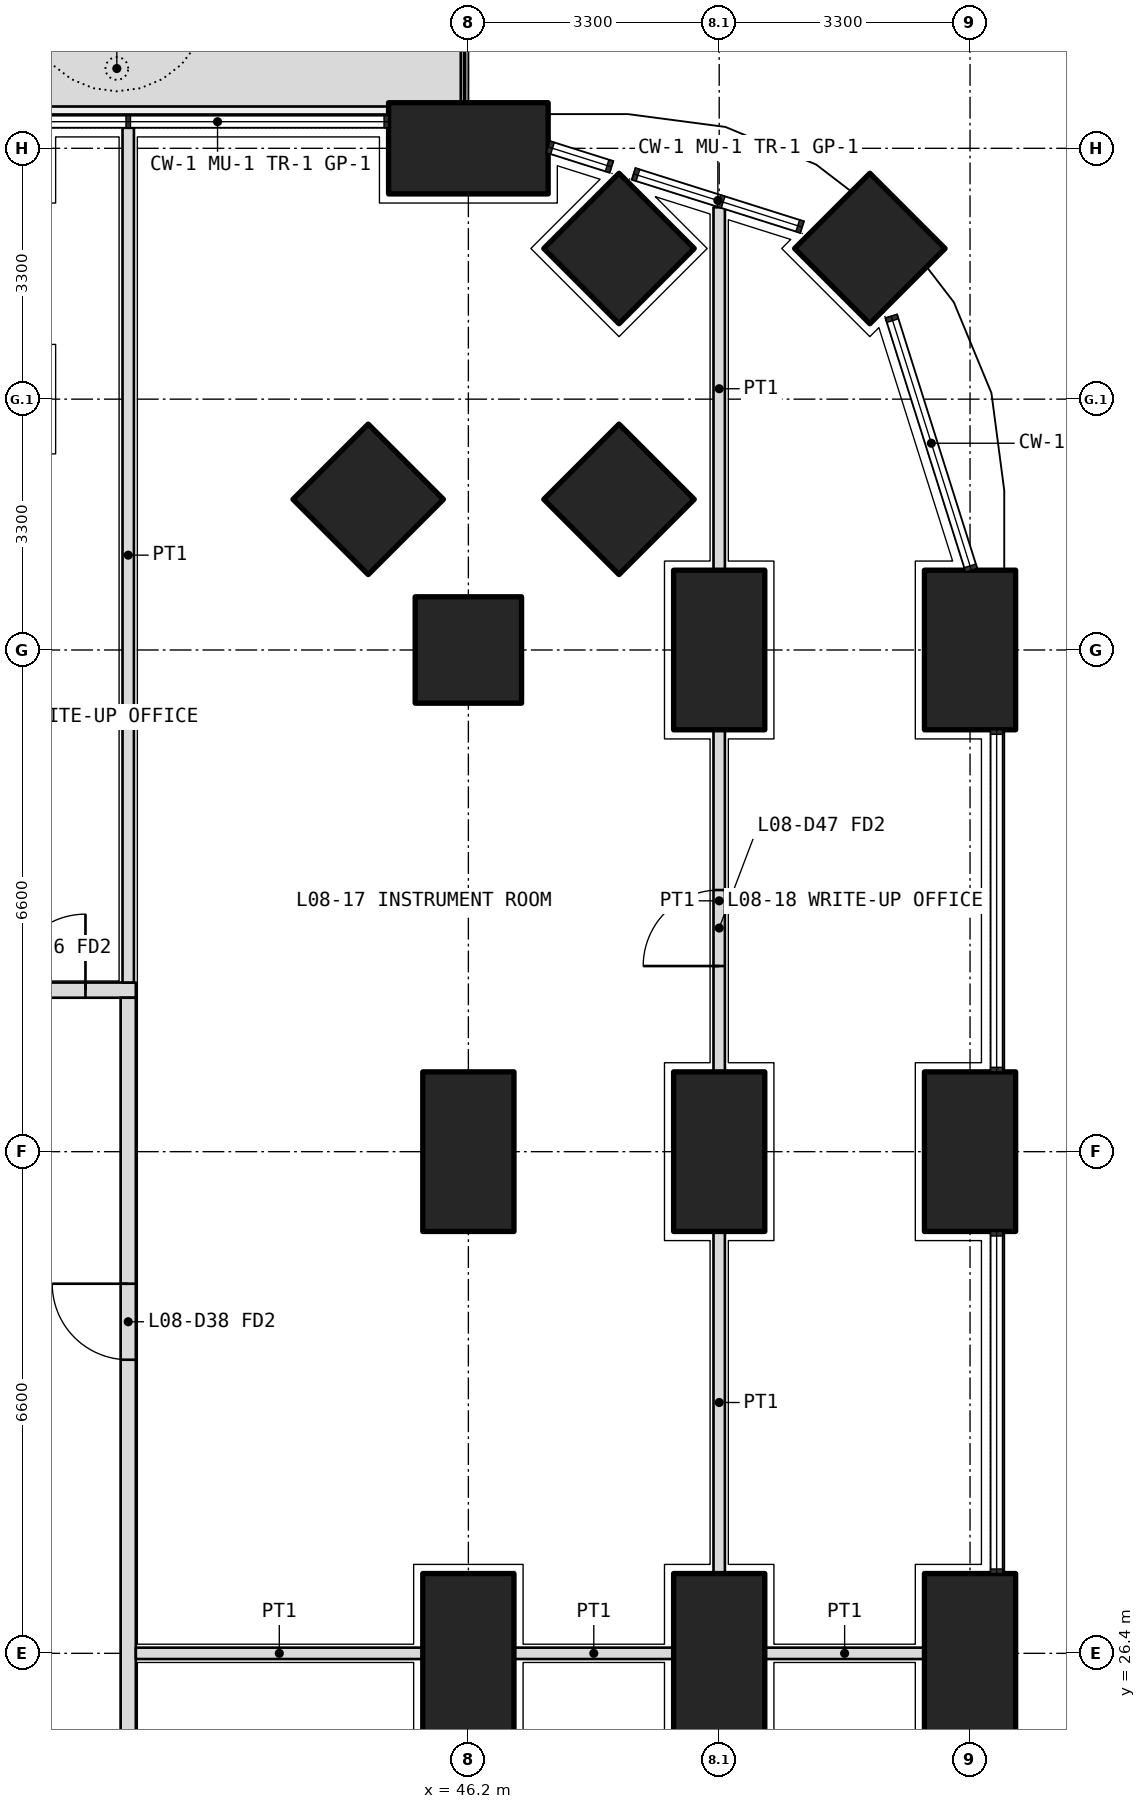
"""IFC4 building model, lengths in metres.
Left out: names, types, materials, properties, quantities, classifications, styles, units other than length and angle.
Written with IfcOpenShell. Run it as: python <this file> out.ifc"""

import sys

from ifc_helpers import new_model, si_unit, direction, frame, frame_2d, origin, origin_2d, place, context, subcontext, project, spatial, polyline, rectangle, outline, extrude, element, fill, save


model = new_model("IFC4")
c1 = context("Model", 3, precision=1e-05, world=origin(), true_north=direction((0.0, 1.0)))
c2 = subcontext(c1, "Body", "Model", "MODEL_VIEW")
j1 = project(units=[si_unit("LENGTHUNIT", "METRE"), si_unit("PLANEANGLEUNIT", "RADIAN")], contexts=[c1])
p1 = place(None, origin())
s1 = spatial("IfcSite", under=j1, at=p1, CompositionType="ELEMENT")
p2 = place(p1, origin())
s2 = spatial("IfcBuilding", under=s1, at=p2, CompositionType="ELEMENT")
p3 = place(p2, frame((0.0, 0.0, 38.1)))
s3 = spatial("IfcBuildingStorey", under=s2, at=p3, CompositionType="ELEMENT", Elevation=38.1)
p4 = place(p3, frame((51.482, 44.882, 0.0), z_axis=(0.0, 0.0, 1.0), x_axis=(0.707106781187, 0.707106781187, 0.0)))
e1 = element("IfcColumn", 1, at=p4, inside=s3, PredefinedType="COLUMN", context=c2, shape_type="SweptSolid", body=[
    extrude(rectangle(XDim=1.4, YDim=1.4, at=origin_2d()), origin(), (0.0, 0.0, 1.0), 4.2),
])
for number, where, z_axis, x_axis in (
    (2, (52.8, 26.4, 0.0), (0.0, 0.0, 1.0), (0.0, 1.0, 0.0)),
    (3, (52.8, 33.0, 0.0), (0.0, 0.0, 1.0), (0.0, 1.0, 0.0)),
    (4, (52.8, 39.6, 0.0), (0.0, 0.0, 1.0), (0.0, 1.0, 0.0)),
    (5, (46.2, 46.2, 0.0), (0.0, 0.0, 1.0), (1.0, 0.0, 0.0)),
):
    element("IfcColumn", number, at=place(p3, frame(where, z_axis=z_axis, x_axis=x_axis)), inside=s3, PredefinedType="COLUMN", context=c2, shape_type="SweptSolid", body=[
        extrude(rectangle(XDim=2.1, YDim=1.2, at=origin_2d()), origin(), (0.0, 0.0, 1.0), 4.2),
    ])
for number, where, z_axis, x_axis in (
    (6, (46.2, 39.6, 0.0), (0.0, 0.0, 1.0), (1.0, 0.0, 0.0)),
    (7, (48.182, 44.882, 0.0), (0.0, 0.0, 1.0), (0.707, 0.707, 0.0)),
):
    element("IfcColumn", number, at=place(p3, frame(where, z_axis=z_axis, x_axis=x_axis)), inside=s3, PredefinedType="COLUMN", context=c2, shape_type="SweptSolid", body=[
        extrude(rectangle(XDim=1.4, YDim=1.4, at=origin_2d()), origin(), (0.0, 0.0, 1.0), 4.2),
    ])
for number, where, z_axis, x_axis in (
    (8, (49.5, 26.4, 0.0), (0.0, 0.0, 1.0), (0.0, 1.0, 0.0)),
    (9, (49.5, 33.0, 0.0), (0.0, 0.0, 1.0), (0.0, 1.0, 0.0)),
    (10, (49.5, 39.6, 0.0), (0.0, 0.0, 1.0), (0.0, 1.0, 0.0)),
):
    element("IfcColumn", number, at=place(p3, frame(where, z_axis=z_axis, x_axis=x_axis)), inside=s3, PredefinedType="COLUMN", context=c2, shape_type="SweptSolid", body=[
        extrude(rectangle(XDim=2.1, YDim=1.2, at=origin_2d()), origin(), (0.0, 0.0, 1.0), 4.2),
    ])
for number, where, z_axis, x_axis in (
    (11, (48.182, 41.582, 0.0), (0.0, 0.0, 1.0), (0.707, 0.707, 0.0)),
    (12, (44.882, 41.582, 0.0), (0.0, 0.0, 1.0), (0.707, 0.707, 0.0)),
):
    element("IfcColumn", number, at=place(p3, frame(where, z_axis=z_axis, x_axis=x_axis)), inside=s3, PredefinedType="COLUMN", context=c2, shape_type="SweptSolid", body=[
        extrude(rectangle(XDim=1.4, YDim=1.4, at=origin_2d()), origin(), (0.0, 0.0, 1.0), 4.2),
    ])
for number, where, z_axis, x_axis in (
    (13, (46.2, 26.4, 0.0), (0.0, 0.0, 1.0), (0.0, 1.0, 0.0)),
    (14, (46.2, 33.0, 0.0), (0.0, 0.0, 1.0), (0.0, 1.0, 0.0)),
):
    element("IfcColumn", number, at=place(p3, frame(where, z_axis=z_axis, x_axis=x_axis)), inside=s3, PredefinedType="COLUMN", context=c2, shape_type="SweptSolid", body=[
        extrude(rectangle(XDim=2.1, YDim=1.2, at=origin_2d()), origin(), (0.0, 0.0, 1.0), 4.2),
    ])
p5 = place(p3, origin())
e15 = element("IfcWall", 15, at=p5, inside=s3, PredefinedType="USERDEFINED", context=c2, shape_type="SweptSolid", body=[
    extrude(outline(polyline([(37.05, 46.75), (46.1, 46.75), (46.1, 47.75), (37.05, 47.75), (37.05, 46.75)]), holes=[polyline([(37.2, 46.9), (45.95, 46.9), (45.95, 47.6), (37.2, 47.6), (37.2, 46.9)])]), origin(), (0.0, 0.0, 1.0), 1.05),
])
p6 = place(p3, frame((33.0, 35.125, 0.0), z_axis=(0.0, 0.0, 1.0), x_axis=(1.0, 0.0, 0.0)))
e16 = element("IfcWall", 16, at=p6, inside=s3, PredefinedType="PARTITIONING", context=c2, shape_type="SweptSolid", body=[
    extrude(rectangle(XDim=8.825, YDim=0.2, at=frame_2d((4.413, 0.0))), origin(), (0.0, 0.0, 1.0), 2.85),
])
p7 = place(p6, frame((1.2, 0.0, 0.0)))
e17 = element("IfcOpeningElement", 17, at=p7, cuts=e16, PredefinedType="OPENING", context=c2, shape_type="SweptSolid", body=[
    extrude(rectangle(XDim=1.0, YDim=2.1, at=frame_2d((0.5, 1.05))), frame((0.0, 0.11, 0.0), z_axis=(0.0, -1.0, 0.0), x_axis=(1.0, 0.0, 0.0)), (0.0, 0.0, 1.0), 0.22),
])
p8 = place(p6, frame((4.5, 0.0, 0.0)))
e18 = element("IfcOpeningElement", 18, at=p8, cuts=e16, PredefinedType="OPENING", context=c2, shape_type="SweptSolid", body=[
    extrude(rectangle(XDim=1.0, YDim=2.1, at=frame_2d((0.5, 1.05))), frame((0.0, 0.11, 0.0), z_axis=(0.0, -1.0, 0.0), x_axis=(1.0, 0.0, 0.0)), (0.0, 0.0, 1.0), 0.22),
])
p9 = place(p6, frame((7.163, 0.0, 0.0)))
e19 = element("IfcOpeningElement", 19, at=p9, cuts=e16, PredefinedType="OPENING", context=c2, shape_type="SweptSolid", body=[
    extrude(rectangle(XDim=1.0, YDim=2.1, at=frame_2d((0.5, 1.05))), frame((0.0, 0.11, 0.0), z_axis=(0.0, -1.0, 0.0), x_axis=(1.0, 0.0, 0.0)), (0.0, 0.0, 1.0), 0.22),
])
p10 = place(p3, frame((41.725, 11.175, 0.0), z_axis=(0.0, 0.0, 1.0), x_axis=(0.0, 1.0, 0.0)))
e20 = element("IfcWall", 20, at=p10, inside=s3, PredefinedType="PARTITIONING", context=c2, shape_type="SweptSolid", body=[
    extrude(rectangle(XDim=23.85, YDim=0.2, at=frame_2d((11.925, 0.0))), origin(), (0.0, 0.0, 1.0), 2.85),
])
p11 = place(p10, frame((2.113, 0.0, 0.0)))
e21 = element("IfcOpeningElement", 21, at=p11, cuts=e20, PredefinedType="OPENING", context=c2, shape_type="SweptSolid", body=[
    extrude(rectangle(XDim=1.0, YDim=2.1, at=frame_2d((0.5, 1.05))), frame((0.0, 0.11, 0.0), z_axis=(0.0, -1.0, 0.0), x_axis=(1.0, 0.0, 0.0)), (0.0, 0.0, 1.0), 0.22),
])
p12 = place(p10, frame((6.475, 0.0, 0.0)))
e22 = element("IfcOpeningElement", 22, at=p12, cuts=e20, PredefinedType="OPENING", context=c2, shape_type="SweptSolid", body=[
    extrude(rectangle(XDim=1.0, YDim=2.1, at=frame_2d((0.5, 1.05))), frame((0.0, 0.11, 0.0), z_axis=(0.0, -1.0, 0.0), x_axis=(1.0, 0.0, 0.0)), (0.0, 0.0, 1.0), 0.22),
])
p13 = place(p10, frame((9.625, 0.0, 0.0)))
e23 = element("IfcOpeningElement", 23, at=p13, cuts=e20, PredefinedType="OPENING", context=c2, shape_type="SweptSolid", body=[
    extrude(rectangle(XDim=1.0, YDim=2.1, at=frame_2d((0.5, 1.05))), frame((0.0, 0.11, 0.0), z_axis=(0.0, -1.0, 0.0), x_axis=(1.0, 0.0, 0.0)), (0.0, 0.0, 1.0), 0.22),
])
p14 = place(p10, frame((12.975, 0.0, 0.0)))
e24 = element("IfcOpeningElement", 24, at=p14, cuts=e20, PredefinedType="OPENING", context=c2, shape_type="SweptSolid", body=[
    extrude(rectangle(XDim=0.9, YDim=2.1, at=frame_2d((0.45, 1.05))), frame((0.0, 0.11, 0.0), z_axis=(0.0, -1.0, 0.0), x_axis=(1.0, 0.0, 0.0)), (0.0, 0.0, 1.0), 0.22),
])
p15 = place(p10, frame((19.087, 0.0, 0.0)))
e25 = element("IfcOpeningElement", 25, at=p15, cuts=e20, PredefinedType="OPENING", context=c2, shape_type="SweptSolid", body=[
    extrude(rectangle(XDim=1.0, YDim=2.1, at=frame_2d((0.5, 1.05))), frame((0.0, 0.11, 0.0), z_axis=(0.0, -1.0, 0.0), x_axis=(1.0, 0.0, 0.0)), (0.0, 0.0, 1.0), 0.22),
])
p16 = place(p3, frame((41.725, 46.47, 0.0), z_axis=(0.0, 0.0, 1.0), x_axis=(0.0, -1.0, 0.0)))
e26 = element("IfcWall", 26, at=p16, inside=s3, PredefinedType="PARTITIONING", context=c2, shape_type="SweptSolid", body=[
    extrude(rectangle(XDim=11.245, YDim=0.15, at=frame_2d((5.623, 0.0))), origin(), (0.0, 0.0, 1.0), 2.7),
])
p17 = place(p3, frame((49.5, 27.45, 0.0), z_axis=(0.0, 0.0, 1.0), x_axis=(0.0, 1.0, 0.0)))
e27 = element("IfcWall", 27, at=p17, inside=s3, PredefinedType="PARTITIONING", context=c2, shape_type="SweptSolid", body=[
    extrude(rectangle(XDim=4.5, YDim=0.15, at=frame_2d((2.25, 0.0))), origin(), (0.0, 0.0, 1.0), 3.9),
])
p18 = place(p3, frame((49.5, 34.05, 0.0), z_axis=(0.0, 0.0, 1.0), x_axis=(0.0, 1.0, 0.0)))
e28 = element("IfcWall", 28, at=p18, inside=s3, PredefinedType="PARTITIONING", context=c2, shape_type="SweptSolid", body=[
    extrude(rectangle(XDim=4.5, YDim=0.15, at=frame_2d((2.25, 0.0))), origin(), (0.0, 0.0, 1.0), 3.9),
])
p19 = place(p18, frame((1.392, 0.0, 0.0)))
e29 = element("IfcOpeningElement", 29, at=p19, cuts=e28, PredefinedType="OPENING", context=c2, shape_type="SweptSolid", body=[
    extrude(rectangle(XDim=1.0, YDim=2.1, at=frame_2d((0.5, 1.05))), frame((0.0, 0.085, 0.0), z_axis=(0.0, -1.0, 0.0), x_axis=(1.0, 0.0, 0.0)), (0.0, 0.0, 1.0), 0.17),
])
p20 = place(p3, frame((49.5, 40.65, 0.0), z_axis=(0.0, 0.0, 1.0), x_axis=(0.0, 1.0, 0.0)))
e30 = element("IfcWall", 30, at=p20, inside=s3, PredefinedType="PARTITIONING", context=c2, shape_type="SweptSolid", body=[
    extrude(rectangle(XDim=4.774, YDim=0.15, at=frame_2d((2.387, 0.0))), origin(), (0.0, 0.0, 1.0), 2.7),
])
for number, where, z_axis, x_axis in (
    (31, (52.2, 26.4, 0.0), (0.0, 0.0, 1.0), (-1.0, 0.0, 0.0)),
    (32, (48.9, 26.4, 0.0), (0.0, 0.0, 1.0), (-1.0, 0.0, 0.0)),
):
    element("IfcWall", number, at=place(p3, frame(where, z_axis=z_axis, x_axis=x_axis)), inside=s3, PredefinedType="PARTITIONING", context=c2, shape_type="SweptSolid", body=[
        extrude(rectangle(XDim=2.1, YDim=0.15, at=frame_2d((1.05, 0.0))), origin(), (0.0, 0.0, 1.0), 2.85),
    ])
p21 = place(p3, frame((45.6, 26.4, 0.0), z_axis=(0.0, 0.0, 1.0), x_axis=(-1.0, 0.0, 0.0)))
e33 = element("IfcWall", 33, at=p21, inside=s3, PredefinedType="PARTITIONING", context=c2, shape_type="SweptSolid", body=[
    extrude(rectangle(XDim=3.775, YDim=0.15, at=frame_2d((1.888, 0.0))), origin(), (0.0, 0.0, 1.0), 2.85),
])
p22 = place(p15, origin())
e34 = element("IfcDoor", 34, at=p22, inside=s3, OperationType="SINGLE_SWING_RIGHT", PredefinedType="DOOR", context=c2, shape_type="SweptSolid", body=[
    extrude(rectangle(XDim=1.0, YDim=2.1, at=frame_2d((0.5, 1.05))), frame((0.0, 0.025, 0.0), z_axis=(0.0, -1.0, 0.0), x_axis=(1.0, 0.0, 0.0)), (0.0, 0.0, 1.0), 0.05),
])
fill(e25, e34)
p23 = place(p19, origin())
e35 = element("IfcDoor", 35, at=p23, inside=s3, OperationType="SINGLE_SWING_LEFT", PredefinedType="DOOR", context=c2, shape_type="SweptSolid", body=[
    extrude(rectangle(XDim=1.0, YDim=2.1, at=frame_2d((0.5, 1.05))), frame((0.0, 0.025, 0.0), z_axis=(0.0, -1.0, 0.0), x_axis=(1.0, 0.0, 0.0)), (0.0, 0.0, 1.0), 0.05),
])
fill(e29, e35)
p24 = place(p9, origin())
e36 = element("IfcDoor", 36, at=p24, inside=s3, OperationType="SINGLE_SWING_RIGHT", PredefinedType="DOOR", context=c2, shape_type="SweptSolid", body=[
    extrude(rectangle(XDim=1.0, YDim=2.1, at=frame_2d((0.5, 1.05))), frame((0.0, 0.025, 0.0), z_axis=(0.0, -1.0, 0.0), x_axis=(1.0, 0.0, 0.0)), (0.0, 0.0, 1.0), 0.05),
])
fill(e19, e36)
save(model, sys.argv[1])
